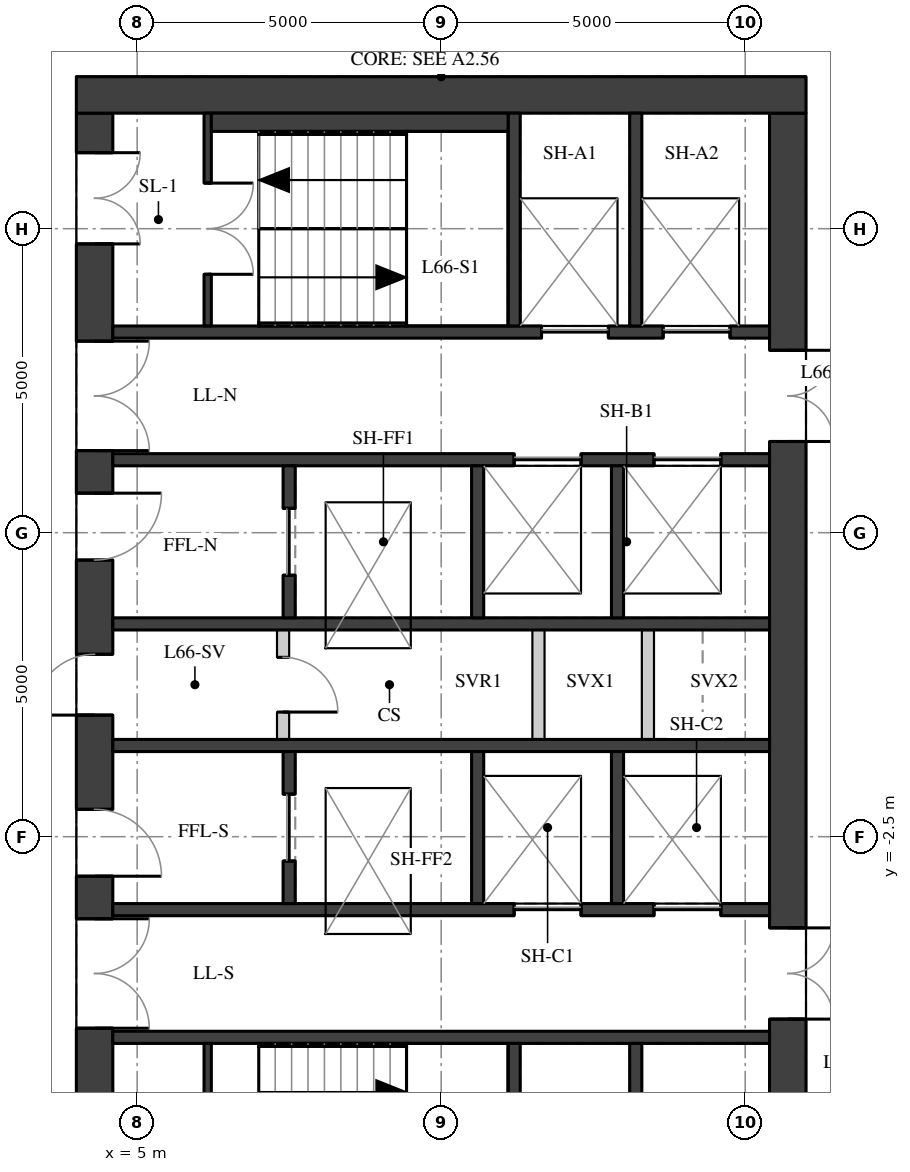
"""IFC4 building model, lengths in metres.
Left out: names, types, materials, properties, quantities, classifications, styles, units other than length and angle.
Written with IfcOpenShell. Run it as: python <this file> out.ifc"""

import sys

from ifc_helpers import new_model, si_unit, direction, frame, frame_2d, origin, place, context, subcontext, project, spatial, rectangle, extrude, element, fill, save


model = new_model("IFC4")
c1 = context("Model", 3, precision=1e-05, world=origin(), true_north=direction((0.0, 1.0)))
c2 = subcontext(c1, "Body", "Model", "MODEL_VIEW")
j1 = project(units=[si_unit("LENGTHUNIT", "METRE"), si_unit("PLANEANGLEUNIT", "RADIAN")], contexts=[c1])
p1 = place(None, origin())
s1 = spatial("IfcSite", under=j1, at=p1, CompositionType="ELEMENT")
p2 = place(p1, origin())
s2 = spatial("IfcBuilding", under=s1, at=p2, CompositionType="ELEMENT")
p3 = place(p2, frame((0.0, 0.0, 233.3)))
s3 = spatial("IfcBuildingStorey", under=s2, at=p3, CompositionType="ELEMENT", Elevation=233.3)
p4 = place(p3, frame((4.3, -9.4, 0.0), z_axis=(0.0, 0.0, 1.0), x_axis=(0.0, 1.0, 0.0)))
e1 = element("IfcWall", 1, at=p4, inside=s3, PredefinedType="SHEAR", context=c2, shape_type="SweptSolid", body=[
    extrude(rectangle(XDim=18.8, YDim=0.6, at=frame_2d((9.4, 0.0))), origin(), (0.0, 0.0, 1.0), 3.02),
])
p5 = place(p4, frame((0.65, 0.0, 0.0)))
e2 = element("IfcOpeningElement", 2, at=p5, cuts=e1, PredefinedType="OPENING", context=c2, shape_type="SweptSolid", body=[
    extrude(rectangle(XDim=1.5, YDim=2.1, at=frame_2d((0.75, 1.05))), frame((0.0, 0.31, 0.0), z_axis=(0.0, -1.0, 0.0), x_axis=(1.0, 0.0, 0.0)), (0.0, 0.0, 1.0), 0.62),
])
p6 = place(p4, frame((3.75, 0.0, 0.0)))
e3 = element("IfcOpeningElement", 3, at=p6, cuts=e1, PredefinedType="OPENING", context=c2, shape_type="SweptSolid", body=[
    extrude(rectangle(XDim=1.8, YDim=2.1, at=frame_2d((0.9, 1.05))), frame((0.0, 0.31, 0.0), z_axis=(0.0, -1.0, 0.0), x_axis=(1.0, 0.0, 0.0)), (0.0, 0.0, 1.0), 0.62),
])
p7 = place(p4, frame((6.25, 0.0, 0.0)))
e4 = element("IfcOpeningElement", 4, at=p7, cuts=e1, PredefinedType="OPENING", context=c2, shape_type="SweptSolid", body=[
    extrude(rectangle(XDim=1.1, YDim=2.1, at=frame_2d((0.55, 1.05))), frame((0.0, 0.31, 0.0), z_axis=(0.0, -1.0, 0.0), x_axis=(1.0, 0.0, 0.0)), (0.0, 0.0, 1.0), 0.62),
])
p8 = place(p4, frame((8.9, 0.0, 0.0)))
e5 = element("IfcOpeningElement", 5, at=p8, cuts=e1, PredefinedType="OPENING", context=c2, shape_type="SweptSolid", body=[
    extrude(rectangle(XDim=1.0, YDim=2.1, at=frame_2d((0.5, 1.05))), frame((0.0, 0.31, 0.0), z_axis=(0.0, -1.0, 0.0), x_axis=(1.0, 0.0, 0.0)), (0.0, 0.0, 1.0), 0.62),
])
p9 = place(p4, frame((11.45, 0.0, 0.0)))
e6 = element("IfcOpeningElement", 6, at=p9, cuts=e1, PredefinedType="OPENING", context=c2, shape_type="SweptSolid", body=[
    extrude(rectangle(XDim=1.1, YDim=2.1, at=frame_2d((0.55, 1.05))), frame((0.0, 0.31, 0.0), z_axis=(0.0, -1.0, 0.0), x_axis=(1.0, 0.0, 0.0)), (0.0, 0.0, 1.0), 0.62),
])
p10 = place(p4, frame((13.25, 0.0, 0.0)))
e7 = element("IfcOpeningElement", 7, at=p10, cuts=e1, PredefinedType="OPENING", context=c2, shape_type="SweptSolid", body=[
    extrude(rectangle(XDim=1.8, YDim=2.1, at=frame_2d((0.9, 1.05))), frame((0.0, 0.31, 0.0), z_axis=(0.0, -1.0, 0.0), x_axis=(1.0, 0.0, 0.0)), (0.0, 0.0, 1.0), 0.62),
])
p11 = place(p4, frame((16.65, 0.0, 0.0)))
e8 = element("IfcOpeningElement", 8, at=p11, cuts=e1, PredefinedType="OPENING", context=c2, shape_type="SweptSolid", body=[
    extrude(rectangle(XDim=1.5, YDim=2.1, at=frame_2d((0.75, 1.05))), frame((0.0, 0.31, 0.0), z_axis=(0.0, -1.0, 0.0), x_axis=(1.0, 0.0, 0.0)), (0.0, 0.0, 1.0), 0.62),
])
p12 = place(p3, frame((15.7, -9.4, 0.0), z_axis=(0.0, 0.0, 1.0), x_axis=(0.0, 1.0, 0.0)))
e9 = element("IfcWall", 9, at=p12, inside=s3, PredefinedType="SHEAR", context=c2, shape_type="SweptSolid", body=[
    extrude(rectangle(XDim=18.8, YDim=0.6, at=frame_2d((9.4, 0.0))), origin(), (0.0, 0.0, 1.0), 3.02),
])
p13 = place(p12, frame((13.4, 0.0, 0.0)))
e10 = element("IfcOpeningElement", 10, at=p13, cuts=e9, PredefinedType="OPENING", context=c2, shape_type="SweptSolid", body=[
    extrude(rectangle(XDim=1.5, YDim=2.1, at=frame_2d((0.75, 1.05))), frame((0.0, 0.31, 0.0), z_axis=(0.0, -1.0, 0.0), x_axis=(1.0, 0.0, 0.0)), (0.0, 0.0, 1.0), 0.62),
])
p14 = place(p12, frame((3.9, 0.0, 0.0)))
e11 = element("IfcOpeningElement", 11, at=p14, cuts=e9, PredefinedType="OPENING", context=c2, shape_type="SweptSolid", body=[
    extrude(rectangle(XDim=1.5, YDim=2.1, at=frame_2d((0.75, 1.05))), frame((0.0, 0.31, 0.0), z_axis=(0.0, -1.0, 0.0), x_axis=(1.0, 0.0, 0.0)), (0.0, 0.0, 1.0), 0.62),
])
p15 = place(p3, frame((4.0, 9.7, 0.0), z_axis=(0.0, 0.0, 1.0), x_axis=(1.0, 0.0, 0.0)))
e12 = element("IfcWall", 12, at=p15, inside=s3, PredefinedType="SHEAR", context=c2, shape_type="SweptSolid", body=[
    extrude(rectangle(XDim=12.0, YDim=0.6, at=frame_2d((6.0, 0.0))), origin(), (0.0, 0.0, 1.0), 3.02),
])
p16 = place(p3, frame((4.6, 5.8, 0.0), z_axis=(0.0, 0.0, 1.0), x_axis=(1.0, 0.0, 0.0)))
e13 = element("IfcWall", 13, at=p16, inside=s3, PredefinedType="SHEAR", context=c2, shape_type="SweptSolid", body=[
    extrude(rectangle(XDim=10.8, YDim=0.2, at=frame_2d((5.4, 0.0))), origin(), (0.0, 0.0, 1.0), 3.02),
])
p17 = place(p16, frame((7.05, 0.0, 0.0)))
e14 = element("IfcOpeningElement", 14, at=p17, cuts=e13, PredefinedType="OPENING", context=c2, shape_type="SweptSolid", body=[
    extrude(rectangle(XDim=1.1, YDim=2.1, at=frame_2d((0.55, 1.05))), frame((0.0, 0.11, 0.0), z_axis=(0.0, -1.0, 0.0), x_axis=(1.0, 0.0, 0.0)), (0.0, 0.0, 1.0), 0.22),
])
p18 = place(p16, frame((9.05, 0.0, 0.0)))
e15 = element("IfcOpeningElement", 15, at=p18, cuts=e13, PredefinedType="OPENING", context=c2, shape_type="SweptSolid", body=[
    extrude(rectangle(XDim=1.1, YDim=2.1, at=frame_2d((0.55, 1.05))), frame((0.0, 0.11, 0.0), z_axis=(0.0, -1.0, 0.0), x_axis=(1.0, 0.0, 0.0)), (0.0, 0.0, 1.0), 0.22),
])
p19 = place(p3, frame((4.6, 3.7, 0.0), z_axis=(0.0, 0.0, 1.0), x_axis=(1.0, 0.0, 0.0)))
e16 = element("IfcWall", 16, at=p19, inside=s3, PredefinedType="SHEAR", context=c2, shape_type="SweptSolid", body=[
    extrude(rectangle(XDim=10.8, YDim=0.2, at=frame_2d((5.4, 0.0))), origin(), (0.0, 0.0, 1.0), 3.02),
])
p20 = place(p19, frame((6.6, 0.0, 0.0)))
e17 = element("IfcOpeningElement", 17, at=p20, cuts=e16, PredefinedType="OPENING", context=c2, shape_type="SweptSolid", body=[
    extrude(rectangle(XDim=1.1, YDim=2.1, at=frame_2d((0.55, 1.05))), frame((0.0, 0.11, 0.0), z_axis=(0.0, -1.0, 0.0), x_axis=(1.0, 0.0, 0.0)), (0.0, 0.0, 1.0), 0.22),
])
p21 = place(p19, frame((8.9, 0.0, 0.0)))
e18 = element("IfcOpeningElement", 18, at=p21, cuts=e16, PredefinedType="OPENING", context=c2, shape_type="SweptSolid", body=[
    extrude(rectangle(XDim=1.1, YDim=2.1, at=frame_2d((0.55, 1.05))), frame((0.0, 0.11, 0.0), z_axis=(0.0, -1.0, 0.0), x_axis=(1.0, 0.0, 0.0)), (0.0, 0.0, 1.0), 0.22),
])
for number, where, z_axis, x_axis in (
    (19, (4.6, 1.0, 0.0), (0.0, 0.0, 1.0), (1.0, 0.0, 0.0)),
    (20, (4.6, -1.0, 0.0), (0.0, 0.0, 1.0), (1.0, 0.0, 0.0)),
):
    element("IfcWall", number, at=place(p3, frame(where, z_axis=z_axis, x_axis=x_axis)), inside=s3, PredefinedType="SHEAR", context=c2, shape_type="SweptSolid", body=[
        extrude(rectangle(XDim=10.8, YDim=0.2, at=frame_2d((5.4, 0.0))), origin(), (0.0, 0.0, 1.0), 3.02),
    ])
p22 = place(p3, frame((4.6, -3.7, 0.0), z_axis=(0.0, 0.0, 1.0), x_axis=(1.0, 0.0, 0.0)))
e21 = element("IfcWall", 21, at=p22, inside=s3, PredefinedType="SHEAR", context=c2, shape_type="SweptSolid", body=[
    extrude(rectangle(XDim=10.8, YDim=0.2, at=frame_2d((5.4, 0.0))), origin(), (0.0, 0.0, 1.0), 3.02),
])
p23 = place(p22, frame((6.6, 0.0, 0.0)))
e22 = element("IfcOpeningElement", 22, at=p23, cuts=e21, PredefinedType="OPENING", context=c2, shape_type="SweptSolid", body=[
    extrude(rectangle(XDim=1.1, YDim=2.1, at=frame_2d((0.55, 1.05))), frame((0.0, 0.11, 0.0), z_axis=(0.0, -1.0, 0.0), x_axis=(1.0, 0.0, 0.0)), (0.0, 0.0, 1.0), 0.22),
])
p24 = place(p22, frame((8.9, 0.0, 0.0)))
e23 = element("IfcOpeningElement", 23, at=p24, cuts=e21, PredefinedType="OPENING", context=c2, shape_type="SweptSolid", body=[
    extrude(rectangle(XDim=1.1, YDim=2.1, at=frame_2d((0.55, 1.05))), frame((0.0, 0.11, 0.0), z_axis=(0.0, -1.0, 0.0), x_axis=(1.0, 0.0, 0.0)), (0.0, 0.0, 1.0), 0.22),
])
p25 = place(p3, frame((4.6, -5.8, 0.0), z_axis=(0.0, 0.0, 1.0), x_axis=(1.0, 0.0, 0.0)))
e24 = element("IfcWall", 24, at=p25, inside=s3, PredefinedType="SHEAR", context=c2, shape_type="SweptSolid", body=[
    extrude(rectangle(XDim=10.8, YDim=0.2, at=frame_2d((5.4, 0.0))), origin(), (0.0, 0.0, 1.0), 3.02),
])
for number, where, z_axis, x_axis in (
    (25, (11.2, 5.9, 0.0), (0.0, 0.0, 1.0), (0.0, 1.0, 0.0)),
    (26, (11.2, -9.4, 0.0), (0.0, 0.0, 1.0), (0.0, 1.0, 0.0)),
    (27, (13.2, 5.9, 0.0), (0.0, 0.0, 1.0), (0.0, 1.0, 0.0)),
    (28, (13.2, -9.4, 0.0), (0.0, 0.0, 1.0), (0.0, 1.0, 0.0)),
):
    element("IfcWall", number, at=place(p3, frame(where, z_axis=z_axis, x_axis=x_axis)), inside=s3, PredefinedType="SHEAR", context=c2, shape_type="SweptSolid", body=[
        extrude(rectangle(XDim=3.5, YDim=0.2, at=frame_2d((1.75, 0.0))), origin(), (0.0, 0.0, 1.0), 3.02),
    ])
p26 = place(p3, frame((7.5, 1.1, 0.0), z_axis=(0.0, 0.0, 1.0), x_axis=(0.0, 1.0, 0.0)))
e29 = element("IfcWall", 29, at=p26, inside=s3, PredefinedType="SHEAR", context=c2, shape_type="SweptSolid", body=[
    extrude(rectangle(XDim=2.5, YDim=0.2, at=frame_2d((1.25, 0.0))), origin(), (0.0, 0.0, 1.0), 3.02),
])
p27 = place(p26, frame((0.7, 0.0, 0.0)))
e30 = element("IfcOpeningElement", 30, at=p27, cuts=e29, PredefinedType="OPENING", context=c2, shape_type="SweptSolid", body=[
    extrude(rectangle(XDim=1.1, YDim=2.1, at=frame_2d((0.55, 1.05))), frame((0.0, 0.11, 0.0), z_axis=(0.0, -1.0, 0.0), x_axis=(1.0, 0.0, 0.0)), (0.0, 0.0, 1.0), 0.22),
])
p28 = place(p3, frame((7.5, -3.6, 0.0), z_axis=(0.0, 0.0, 1.0), x_axis=(0.0, 1.0, 0.0)))
e31 = element("IfcWall", 31, at=p28, inside=s3, PredefinedType="SHEAR", context=c2, shape_type="SweptSolid", body=[
    extrude(rectangle(XDim=2.5, YDim=0.2, at=frame_2d((1.25, 0.0))), origin(), (0.0, 0.0, 1.0), 3.02),
])
p29 = place(p28, frame((0.7, 0.0, 0.0)))
e32 = element("IfcOpeningElement", 32, at=p29, cuts=e31, PredefinedType="OPENING", context=c2, shape_type="SweptSolid", body=[
    extrude(rectangle(XDim=1.1, YDim=2.1, at=frame_2d((0.55, 1.05))), frame((0.0, 0.11, 0.0), z_axis=(0.0, -1.0, 0.0), x_axis=(1.0, 0.0, 0.0)), (0.0, 0.0, 1.0), 0.22),
])
for number, where, z_axis, x_axis in (
    (33, (10.6, 1.1, 0.0), (0.0, 0.0, 1.0), (0.0, 1.0, 0.0)),
    (34, (10.6, -3.6, 0.0), (0.0, 0.0, 1.0), (0.0, 1.0, 0.0)),
    (35, (12.9, 1.1, 0.0), (0.0, 0.0, 1.0), (0.0, 1.0, 0.0)),
    (36, (12.9, -3.6, 0.0), (0.0, 0.0, 1.0), (0.0, 1.0, 0.0)),
):
    element("IfcWall", number, at=place(p3, frame(where, z_axis=z_axis, x_axis=x_axis)), inside=s3, PredefinedType="SHEAR", context=c2, shape_type="SweptSolid", body=[
        extrude(rectangle(XDim=2.5, YDim=0.2, at=frame_2d((1.25, 0.0))), origin(), (0.0, 0.0, 1.0), 3.02),
    ])
p30 = place(p3, frame((6.16, 5.9, 0.0), z_axis=(0.0, 0.0, 1.0), x_axis=(0.0, 1.0, 0.0)))
e37 = element("IfcWall", 37, at=p30, inside=s3, PredefinedType="SHEAR", context=c2, shape_type="SweptSolid", body=[
    extrude(rectangle(XDim=3.5, YDim=0.12, at=frame_2d((1.75, 0.0))), origin(), (0.0, 0.0, 1.0), 3.02),
])
p31 = place(p30, frame((0.85, 0.0, 0.0)))
e38 = element("IfcOpeningElement", 38, at=p31, cuts=e37, PredefinedType="OPENING", context=c2, shape_type="SweptSolid", body=[
    extrude(rectangle(XDim=1.5, YDim=2.1, at=frame_2d((0.75, 1.05))), frame((0.0, 0.07, 0.0), z_axis=(0.0, -1.0, 0.0), x_axis=(1.0, 0.0, 0.0)), (0.0, 0.0, 1.0), 0.14),
])
p32 = place(p3, frame((6.16, -9.4, 0.0), z_axis=(0.0, 0.0, 1.0), x_axis=(0.0, 1.0, 0.0)))
e39 = element("IfcWall", 39, at=p32, inside=s3, PredefinedType="SHEAR", context=c2, shape_type="SweptSolid", body=[
    extrude(rectangle(XDim=3.5, YDim=0.12, at=frame_2d((1.75, 0.0))), origin(), (0.0, 0.0, 1.0), 3.02),
])
p33 = place(p32, frame((1.15, 0.0, 0.0)))
e40 = element("IfcOpeningElement", 40, at=p33, cuts=e39, PredefinedType="OPENING", context=c2, shape_type="SweptSolid", body=[
    extrude(rectangle(XDim=1.5, YDim=2.1, at=frame_2d((0.75, 1.05))), frame((0.0, 0.07, 0.0), z_axis=(0.0, -1.0, 0.0), x_axis=(1.0, 0.0, 0.0)), (0.0, 0.0, 1.0), 0.14),
])
p34 = place(p3, frame((7.4, -0.9, 0.0), z_axis=(0.0, 0.0, 1.0), x_axis=(0.0, 1.0, 0.0)))
e41 = element("IfcWall", 41, at=p34, inside=s3, PredefinedType="PARTITIONING", context=c2, shape_type="SweptSolid", body=[
    extrude(rectangle(XDim=1.8, YDim=0.2, at=frame_2d((0.9, 0.0))), origin(), (0.0, 0.0, 1.0), 3.02),
])
p35 = place(p34, frame((0.45, 0.0, 0.0)))
e42 = element("IfcOpeningElement", 42, at=p35, cuts=e41, PredefinedType="OPENING", context=c2, shape_type="SweptSolid", body=[
    extrude(rectangle(XDim=0.9, YDim=2.1, at=frame_2d((0.45, 1.05))), frame((0.0, 0.11, 0.0), z_axis=(0.0, -1.0, 0.0), x_axis=(1.0, 0.0, 0.0)), (0.0, 0.0, 1.0), 0.22),
])
for number, where, z_axis, x_axis in (
    (43, (11.6, -0.9, 0.0), (0.0, 0.0, 1.0), (0.0, 1.0, 0.0)),
    (44, (13.4, -0.9, 0.0), (0.0, 0.0, 1.0), (0.0, 1.0, 0.0)),
):
    element("IfcWall", number, at=place(p3, frame(where, z_axis=z_axis, x_axis=x_axis)), inside=s3, PredefinedType="PARTITIONING", context=c2, shape_type="SweptSolid", body=[
        extrude(rectangle(XDim=1.8, YDim=0.2, at=frame_2d((0.9, 0.0))), origin(), (0.0, 0.0, 1.0), 3.02),
    ])
p36 = place(p3, frame((6.22, 9.25, 0.0), z_axis=(0.0, 0.0, 1.0), x_axis=(1.0, 0.0, 0.0)))
e45 = element("IfcWall", 45, at=p36, inside=s3, PredefinedType="PARTITIONING", context=c2, shape_type="SweptSolid", body=[
    extrude(rectangle(XDim=4.88, YDim=0.3, at=frame_2d((2.44, 0.0))), origin(), (0.0, 0.0, 1.0), 3.02),
])
p37 = place(p6, origin())
e46 = element("IfcDoor", 46, at=p37, inside=s3, OperationType="DOUBLE_DOOR_SINGLE_SWING", PredefinedType="DOOR", context=c2, shape_type="SweptSolid", body=[
    extrude(rectangle(XDim=1.8, YDim=2.1, at=frame_2d((0.9, 1.05))), frame((0.0, 0.025, 0.0), z_axis=(0.0, -1.0, 0.0), x_axis=(1.0, 0.0, 0.0)), (0.0, 0.0, 1.0), 0.05),
])
fill(e3, e46)
p38 = place(p7, origin())
e47 = element("IfcDoor", 47, at=p38, inside=s3, OperationType="SINGLE_SWING_RIGHT", PredefinedType="DOOR", context=c2, shape_type="SweptSolid", body=[
    extrude(rectangle(XDim=1.1, YDim=2.1, at=frame_2d((0.55, 1.05))), frame((0.0, 0.025, 0.0), z_axis=(0.0, -1.0, 0.0), x_axis=(1.0, 0.0, 0.0)), (0.0, 0.0, 1.0), 0.05),
])
fill(e4, e47)
p39 = place(p8, origin())
e48 = element("IfcDoor", 48, at=p39, inside=s3, OperationType="SINGLE_SWING_LEFT", PredefinedType="DOOR", context=c2, shape_type="SweptSolid", body=[
    extrude(rectangle(XDim=1.0, YDim=2.1, at=frame_2d((0.5, 1.05))), frame((0.0, 0.025, 0.0), z_axis=(0.0, -1.0, 0.0), x_axis=(1.0, 0.0, 0.0)), (0.0, 0.0, 1.0), 0.05),
])
fill(e5, e48)
p40 = place(p9, origin())
e49 = element("IfcDoor", 49, at=p40, inside=s3, OperationType="SINGLE_SWING_LEFT", PredefinedType="DOOR", context=c2, shape_type="SweptSolid", body=[
    extrude(rectangle(XDim=1.1, YDim=2.1, at=frame_2d((0.55, 1.05))), frame((0.0, 0.025, 0.0), z_axis=(0.0, -1.0, 0.0), x_axis=(1.0, 0.0, 0.0)), (0.0, 0.0, 1.0), 0.05),
])
fill(e6, e49)
p41 = place(p10, origin())
e50 = element("IfcDoor", 50, at=p41, inside=s3, OperationType="DOUBLE_DOOR_SINGLE_SWING", PredefinedType="DOOR", context=c2, shape_type="SweptSolid", body=[
    extrude(rectangle(XDim=1.8, YDim=2.1, at=frame_2d((0.9, 1.05))), frame((0.0, 0.025, 0.0), z_axis=(0.0, -1.0, 0.0), x_axis=(1.0, 0.0, 0.0)), (0.0, 0.0, 1.0), 0.05),
])
fill(e7, e50)
p42 = place(p11, origin())
e51 = element("IfcDoor", 51, at=p42, inside=s3, OperationType="DOUBLE_DOOR_SINGLE_SWING", PredefinedType="DOOR", context=c2, shape_type="SweptSolid", body=[
    extrude(rectangle(XDim=1.5, YDim=2.1, at=frame_2d((0.75, 1.05))), frame((0.0, 0.025, 0.0), z_axis=(0.0, -1.0, 0.0), x_axis=(1.0, 0.0, 0.0)), (0.0, 0.0, 1.0), 0.05),
])
fill(e8, e51)
p43 = place(p13, origin())
e52 = element("IfcDoor", 52, at=p43, inside=s3, OperationType="DOUBLE_DOOR_SINGLE_SWING", PredefinedType="DOOR", context=c2, shape_type="SweptSolid", body=[
    extrude(rectangle(XDim=1.5, YDim=2.1, at=frame_2d((0.75, 1.05))), frame((0.0, 0.025, 0.0), z_axis=(0.0, -1.0, 0.0), x_axis=(1.0, 0.0, 0.0)), (0.0, 0.0, 1.0), 0.05),
])
fill(e10, e52)
p44 = place(p14, origin())
e53 = element("IfcDoor", 53, at=p44, inside=s3, OperationType="DOUBLE_DOOR_SINGLE_SWING", PredefinedType="DOOR", context=c2, shape_type="SweptSolid", body=[
    extrude(rectangle(XDim=1.5, YDim=2.1, at=frame_2d((0.75, 1.05))), frame((0.0, 0.025, 0.0), z_axis=(0.0, -1.0, 0.0), x_axis=(1.0, 0.0, 0.0)), (0.0, 0.0, 1.0), 0.05),
])
fill(e11, e53)
p45 = place(p31, origin())
e54 = element("IfcDoor", 54, at=p45, inside=s3, OperationType="DOUBLE_DOOR_SINGLE_SWING", PredefinedType="DOOR", context=c2, shape_type="SweptSolid", body=[
    extrude(rectangle(XDim=1.5, YDim=2.1, at=frame_2d((0.75, 1.05))), frame((0.0, 0.025, 0.0), z_axis=(0.0, -1.0, 0.0), x_axis=(1.0, 0.0, 0.0)), (0.0, 0.0, 1.0), 0.05),
])
fill(e38, e54)
p46 = place(p17, origin())
e55 = element("IfcDoor", 55, at=p46, inside=s3, OperationType="DOUBLE_DOOR_SLIDING", PredefinedType="DOOR", context=c2, shape_type="SweptSolid", body=[
    extrude(rectangle(XDim=1.1, YDim=2.1, at=frame_2d((0.55, 1.05))), frame((0.0, 0.025, 0.0), z_axis=(0.0, -1.0, 0.0), x_axis=(1.0, 0.0, 0.0)), (0.0, 0.0, 1.0), 0.05),
])
fill(e14, e55)
p47 = place(p18, origin())
e56 = element("IfcDoor", 56, at=p47, inside=s3, OperationType="DOUBLE_DOOR_SLIDING", PredefinedType="DOOR", context=c2, shape_type="SweptSolid", body=[
    extrude(rectangle(XDim=1.1, YDim=2.1, at=frame_2d((0.55, 1.05))), frame((0.0, 0.025, 0.0), z_axis=(0.0, -1.0, 0.0), x_axis=(1.0, 0.0, 0.0)), (0.0, 0.0, 1.0), 0.05),
])
fill(e15, e56)
p48 = place(p20, origin())
e57 = element("IfcDoor", 57, at=p48, inside=s3, OperationType="DOUBLE_DOOR_SLIDING", PredefinedType="DOOR", context=c2, shape_type="SweptSolid", body=[
    extrude(rectangle(XDim=1.1, YDim=2.1, at=frame_2d((0.55, 1.05))), frame((0.0, 0.025, 0.0), z_axis=(0.0, -1.0, 0.0), x_axis=(1.0, 0.0, 0.0)), (0.0, 0.0, 1.0), 0.05),
])
fill(e17, e57)
p49 = place(p21, origin())
e58 = element("IfcDoor", 58, at=p49, inside=s3, OperationType="DOUBLE_DOOR_SLIDING", PredefinedType="DOOR", context=c2, shape_type="SweptSolid", body=[
    extrude(rectangle(XDim=1.1, YDim=2.1, at=frame_2d((0.55, 1.05))), frame((0.0, 0.025, 0.0), z_axis=(0.0, -1.0, 0.0), x_axis=(1.0, 0.0, 0.0)), (0.0, 0.0, 1.0), 0.05),
])
fill(e18, e58)
p50 = place(p23, origin())
e59 = element("IfcDoor", 59, at=p50, inside=s3, OperationType="DOUBLE_DOOR_SLIDING", PredefinedType="DOOR", context=c2, shape_type="SweptSolid", body=[
    extrude(rectangle(XDim=1.1, YDim=2.1, at=frame_2d((0.55, 1.05))), frame((0.0, 0.025, 0.0), z_axis=(0.0, -1.0, 0.0), x_axis=(1.0, 0.0, 0.0)), (0.0, 0.0, 1.0), 0.05),
])
fill(e22, e59)
p51 = place(p24, origin())
e60 = element("IfcDoor", 60, at=p51, inside=s3, OperationType="DOUBLE_DOOR_SLIDING", PredefinedType="DOOR", context=c2, shape_type="SweptSolid", body=[
    extrude(rectangle(XDim=1.1, YDim=2.1, at=frame_2d((0.55, 1.05))), frame((0.0, 0.025, 0.0), z_axis=(0.0, -1.0, 0.0), x_axis=(1.0, 0.0, 0.0)), (0.0, 0.0, 1.0), 0.05),
])
fill(e23, e60)
p52 = place(p27, origin())
e61 = element("IfcDoor", 61, at=p52, inside=s3, OperationType="DOUBLE_DOOR_SLIDING", PredefinedType="DOOR", context=c2, shape_type="SweptSolid", body=[
    extrude(rectangle(XDim=1.1, YDim=2.1, at=frame_2d((0.55, 1.05))), frame((0.0, 0.025, 0.0), z_axis=(0.0, -1.0, 0.0), x_axis=(1.0, 0.0, 0.0)), (0.0, 0.0, 1.0), 0.05),
])
fill(e30, e61)
p53 = place(p29, origin())
e62 = element("IfcDoor", 62, at=p53, inside=s3, OperationType="DOUBLE_DOOR_SLIDING", PredefinedType="DOOR", context=c2, shape_type="SweptSolid", body=[
    extrude(rectangle(XDim=1.1, YDim=2.1, at=frame_2d((0.55, 1.05))), frame((0.0, 0.025, 0.0), z_axis=(0.0, -1.0, 0.0), x_axis=(1.0, 0.0, 0.0)), (0.0, 0.0, 1.0), 0.05),
])
fill(e32, e62)
p54 = place(p35, origin())
e63 = element("IfcDoor", 63, at=p54, inside=s3, OperationType="SINGLE_SWING_RIGHT", PredefinedType="DOOR", context=c2, shape_type="SweptSolid", body=[
    extrude(rectangle(XDim=0.9, YDim=2.1, at=frame_2d((0.45, 1.05))), frame((0.0, 0.025, 0.0), z_axis=(0.0, -1.0, 0.0), x_axis=(1.0, 0.0, 0.0)), (0.0, 0.0, 1.0), 0.05),
])
fill(e42, e63)
save(model, sys.argv[1])
